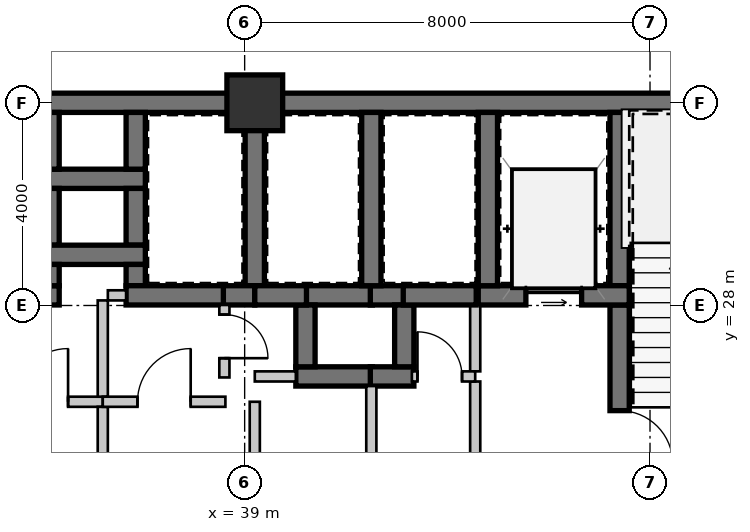
"""IFC4 building model, lengths in metres.
Left out: names, types, materials, properties, quantities, classifications, styles, units other than length and angle.
Written with IfcOpenShell. Run it as: python <this file> out.ifc"""

import sys

from ifc_helpers import new_model, si_unit, direction, frame, frame_2d, origin, origin_2d, place, context, subcontext, project, spatial, rectangle, extrude, source, transform, mapped, element, fill, save


model = new_model("IFC4")
c1 = context("Model", 3, precision=1e-05, world=origin(), true_north=direction((0.0, 1.0)))
c2 = subcontext(c1, "Body", "Model", "MODEL_VIEW")
j1 = project(units=[si_unit("LENGTHUNIT", "METRE"), si_unit("PLANEANGLEUNIT", "RADIAN")], contexts=[c1])
p1 = place(None, origin())
s1 = spatial("IfcSite", under=j1, at=p1, CompositionType="ELEMENT")
p2 = place(p1, origin())
s2 = spatial("IfcBuilding", under=s1, at=p2, CompositionType="ELEMENT")
p3 = place(p2, frame((0.0, 0.0, 12.95)))
s3 = spatial("IfcBuildingStorey", under=s2, at=p3, CompositionType="ELEMENT", Elevation=12.95)
m1 = source(origin(), c2, "Body", "SweptSolid", [
    extrude(rectangle(XDim=1.1, YDim=1.1, at=origin_2d()), origin(), (0.0, 0.0, 1.0), 3.85),
])
p4 = place(p3, frame((39.2, 32.0, 0.0), z_axis=(0.0, 0.0, 1.0), x_axis=(1.0, 0.0, 0.0)))
e1 = element("IfcColumn", 1, at=p4, inside=s3, PredefinedType="COLUMN", context=c2, shape_type="MappedRepresentation", body=[
    mapped(m1, transform((0.0, 0.0, 0.0), scale=1.0)),
])
m2 = source(origin(), c2, "Body", "SweptSolid", [
    extrude(rectangle(XDim=11.2, YDim=0.38, at=frame_2d((5.6, 0.0))), origin(), (0.0, 0.0, 1.0), 3.43),
])
p5 = place(p3, frame((28.0, 32.0, 0.0), z_axis=(0.0, 0.0, 1.0), x_axis=(1.0, 0.0, 0.0)))
e2 = element("IfcWall", 2, at=p5, inside=s3, PredefinedType="SHEAR", context=c2, shape_type="MappedRepresentation", body=[
    mapped(m2, transform((0.0, 0.0, 0.0), scale=1.0)),
])
m3 = source(origin(), c2, "Body", "SweptSolid", [
    extrude(rectangle(XDim=11.99, YDim=0.38, at=frame_2d((5.995, 0.0))), origin(), (0.0, 0.0, 1.0), 3.43),
])
p6 = place(p3, frame((39.2, 32.0, 0.0), z_axis=(0.0, 0.0, 1.0), x_axis=(1.0, 0.0, 0.0)))
e3 = element("IfcWall", 3, at=p6, inside=s3, PredefinedType="SHEAR", context=c2, shape_type="MappedRepresentation", body=[
    mapped(m3, transform((0.0, 0.0, 0.0), scale=1.0)),
])
m4 = source(origin(), c2, "Body", "SweptSolid", [
    extrude(rectangle(XDim=3.42, YDim=0.38, at=frame_2d((1.71, 0.0))), origin(), (0.0, 0.0, 1.0), 3.43),
])
p7 = place(p3, frame((46.4, 31.81, 0.0), z_axis=(0.0, 0.0, 1.0), x_axis=(0.0, -1.0, 0.0)))
e4 = element("IfcWall", 4, at=p7, inside=s3, PredefinedType="SHEAR", context=c2, shape_type="MappedRepresentation", body=[
    mapped(m4, transform((0.0, 0.0, 0.0), scale=1.0)),
])
m5 = source(origin(), c2, "Body", "SweptSolid", [
    extrude(rectangle(XDim=3.82, YDim=0.38, at=frame_2d((1.91, 0.0))), origin(), (0.0, 0.0, 1.0), 3.43),
])
p8 = place(p3, frame((46.4, 28.01, 0.0), z_axis=(0.0, 0.0, 1.0), x_axis=(0.0, -1.0, 0.0)))
e5 = element("IfcWall", 5, at=p8, inside=s3, PredefinedType="SHEAR", context=c2, shape_type="MappedRepresentation", body=[
    mapped(m5, transform((0.0, 0.0, 0.0), scale=1.0)),
])
m6 = source(origin(), c2, "Body", "SweptSolid", [
    extrude(rectangle(XDim=1.05, YDim=2.1, at=frame_2d((0.525, 1.05))), frame((0.0, 0.2, 0.0), z_axis=(0.0, -1.0, 0.0), x_axis=(1.0, 0.0, 0.0)), (0.0, 0.0, 1.0), 0.4),
])
p9 = place(p8, frame((2.085, 0.0, 0.0)))
e6 = element("IfcOpeningElement", 6, at=p9, cuts=e5, PredefinedType="OPENING", context=c2, shape_type="MappedRepresentation", body=[
    mapped(m6, transform((0.0, 0.0, 0.0), scale=1.0)),
])
m7 = source(origin(), c2, "Body", "SweptSolid", [
    extrude(rectangle(XDim=2.98, YDim=0.38, at=frame_2d((1.49, 0.0))), origin(), (0.0, 0.0, 1.0), 3.43),
])
p10 = place(p3, frame((43.61, 28.2, 0.0), z_axis=(0.0, 0.0, 1.0), x_axis=(1.0, 0.0, 0.0)))
e7 = element("IfcWall", 7, at=p10, inside=s3, PredefinedType="SHEAR", context=c2, shape_type="MappedRepresentation", body=[
    mapped(m7, transform((0.0, 0.0, 0.0), scale=1.0)),
])
m8 = source(origin(), c2, "Body", "SweptSolid", [
    extrude(rectangle(XDim=1.1, YDim=2.15, at=frame_2d((0.55, 1.075))), frame((0.0, 0.2, 0.0), z_axis=(0.0, -1.0, 0.0), x_axis=(1.0, 0.0, 0.0)), (0.0, 0.0, 1.0), 0.4),
])
p11 = place(p10, frame((0.94, 0.0, 0.0)))
e8 = element("IfcOpeningElement", 8, at=p11, cuts=e7, PredefinedType="OPENING", context=c2, shape_type="MappedRepresentation", body=[
    mapped(m8, transform((0.0, 0.0, 0.0), scale=1.0)),
])
p12 = place(p3, frame((43.8, 31.81, 0.0), z_axis=(0.0, 0.0, 1.0), x_axis=(0.0, -1.0, 0.0)))
e9 = element("IfcWall", 9, at=p12, inside=s3, PredefinedType="SHEAR", context=c2, shape_type="MappedRepresentation", body=[
    mapped(m4, transform((0.0, 0.0, 0.0), scale=1.0)),
])
m9 = source(origin(), c2, "Body", "SweptSolid", [
    extrude(rectangle(XDim=2.4, YDim=0.2, at=frame_2d((1.2, 0.0))), origin(), (0.0, 0.0, 1.0), 3.43),
])
p13 = place(p3, frame((43.55, 26.5, 0.0), z_axis=(0.0, 0.0, 1.0), x_axis=(0.0, -1.0, 0.0)))
e10 = element("IfcWall", 10, at=p13, inside=s3, PredefinedType="SOLIDWALL", context=c2, shape_type="MappedRepresentation", body=[
    mapped(m9, transform((0.0, 0.0, 0.0), scale=1.0)),
])
m10 = source(origin(), c2, "Body", "SweptSolid", [
    extrude(rectangle(XDim=1.31, YDim=0.2, at=frame_2d((0.655, 0.0))), origin(), (0.0, 0.0, 1.0), 3.43),
])
p14 = place(p3, frame((43.55, 28.01, 0.0), z_axis=(0.0, 0.0, 1.0), x_axis=(0.0, -1.0, 0.0)))
e11 = element("IfcWall", 11, at=p14, inside=s3, PredefinedType="SOLIDWALL", context=c2, shape_type="MappedRepresentation", body=[
    mapped(m10, transform((0.0, 0.0, 0.0), scale=1.0)),
])
m11 = source(origin(), c2, "Body", "SweptSolid", [
    extrude(rectangle(XDim=2.08, YDim=0.38, at=frame_2d((1.04, 0.0))), origin(), (0.0, 0.0, 1.0), 3.43),
])
p15 = place(p3, frame((34.96, 30.5, 0.0), z_axis=(0.0, 0.0, 1.0), x_axis=(1.0, 0.0, 0.0)))
e12 = element("IfcWall", 12, at=p15, inside=s3, PredefinedType="SHEAR", context=c2, shape_type="MappedRepresentation", body=[
    mapped(m11, transform((0.0, 0.0, 0.0), scale=1.0)),
])
m12 = source(origin(), c2, "Body", "SweptSolid", [
    extrude(rectangle(XDim=1.12, YDim=0.38, at=frame_2d((0.56, 0.0))), origin(), (0.0, 0.0, 1.0), 3.43),
])
for number, where, z_axis, x_axis in (
    (13, (35.15, 31.81, 0.0), (0.0, 0.0, 1.0), (0.0, -1.0, 0.0)),
    (14, (36.85, 30.69, 0.0), (0.0, 0.0, 1.0), (0.0, 1.0, 0.0)),
    (15, (35.15, 30.31, 0.0), (0.0, 0.0, 1.0), (0.0, -1.0, 0.0)),
    (16, (36.85, 29.19, 0.0), (0.0, 0.0, 1.0), (0.0, 1.0, 0.0)),
):
    element("IfcWall", number, at=place(p3, frame(where, z_axis=z_axis, x_axis=x_axis)), inside=s3, PredefinedType="SHEAR", context=c2, shape_type="MappedRepresentation", body=[
        mapped(m12, transform((0.0, 0.0, 0.0), scale=1.0)),
    ])
p16 = place(p3, frame((34.96, 29.0, 0.0), z_axis=(0.0, 0.0, 1.0), x_axis=(1.0, 0.0, 0.0)))
e17 = element("IfcWall", 17, at=p16, inside=s3, PredefinedType="SHEAR", context=c2, shape_type="MappedRepresentation", body=[
    mapped(m11, transform((0.0, 0.0, 0.0), scale=1.0)),
])
m13 = source(origin(), c2, "Body", "SweptSolid", [
    extrude(rectangle(XDim=1.32, YDim=0.38, at=frame_2d((0.66, 0.0))), origin(), (0.0, 0.0, 1.0), 3.43),
])
p17 = place(p3, frame((41.52, 28.2, 0.0), z_axis=(0.0, 0.0, 1.0), x_axis=(-1.0, 0.0, 0.0)))
e18 = element("IfcWall", 18, at=p17, inside=s3, PredefinedType="SHEAR", context=c2, shape_type="MappedRepresentation", body=[
    mapped(m13, transform((0.0, 0.0, 0.0), scale=1.0)),
])
m14 = source(origin(), c2, "Body", "SweptSolid", [
    extrude(rectangle(XDim=0.67, YDim=0.38, at=frame_2d((0.335, 0.0))), origin(), (0.0, 0.0, 1.0), 3.43),
])
p18 = place(p3, frame((42.15, 28.2, 0.0), z_axis=(0.0, 0.0, 1.0), x_axis=(-1.0, 0.0, 0.0)))
e19 = element("IfcWall", 19, at=p18, inside=s3, PredefinedType="SHEAR", context=c2, shape_type="MappedRepresentation", body=[
    mapped(m14, transform((0.0, 0.0, 0.0), scale=1.0)),
])
m15 = source(origin(), c2, "Body", "SweptSolid", [
    extrude(rectangle(XDim=1.51, YDim=0.38, at=frame_2d((0.755, 0.0))), origin(), (0.0, 0.0, 1.0), 3.43),
])
p19 = place(p3, frame((40.01, 26.6, 0.0), z_axis=(0.0, 0.0, 1.0), x_axis=(1.0, 0.0, 0.0)))
e20 = element("IfcWall", 20, at=p19, inside=s3, PredefinedType="SHEAR", context=c2, shape_type="MappedRepresentation", body=[
    mapped(m15, transform((0.0, 0.0, 0.0), scale=1.0)),
])
m16 = source(origin(), c2, "Body", "SweptSolid", [
    extrude(rectangle(XDim=1.22, YDim=0.38, at=frame_2d((0.61, 0.0))), origin(), (0.0, 0.0, 1.0), 3.43),
])
p20 = place(p3, frame((40.2, 28.01, 0.0), z_axis=(0.0, 0.0, 1.0), x_axis=(0.0, -1.0, 0.0)))
e21 = element("IfcWall", 21, at=p20, inside=s3, PredefinedType="SHEAR", context=c2, shape_type="MappedRepresentation", body=[
    mapped(m16, transform((0.0, 0.0, 0.0), scale=1.0)),
])
m17 = source(origin(), c2, "Body", "SweptSolid", [
    extrude(rectangle(XDim=0.86, YDim=0.38, at=frame_2d((0.43, 0.0))), origin(), (0.0, 0.0, 1.0), 3.43),
])
p21 = place(p3, frame((41.48, 26.6, 0.0), z_axis=(0.0, 0.0, 1.0), x_axis=(1.0, 0.0, 0.0)))
e22 = element("IfcWall", 22, at=p21, inside=s3, PredefinedType="SHEAR", context=c2, shape_type="MappedRepresentation", body=[
    mapped(m17, transform((0.0, 0.0, 0.0), scale=1.0)),
])
p22 = place(p3, frame((42.15, 26.79, 0.0), z_axis=(0.0, 0.0, 1.0), x_axis=(0.0, 1.0, 0.0)))
e23 = element("IfcWall", 23, at=p22, inside=s3, PredefinedType="SHEAR", context=c2, shape_type="MappedRepresentation", body=[
    mapped(m16, transform((0.0, 0.0, 0.0), scale=1.0)),
])
m18 = source(origin(), c2, "Body", "SweptSolid", [
    extrude(rectangle(XDim=1.56, YDim=0.38, at=frame_2d((0.78, 0.0))), origin(), (0.0, 0.0, 1.0), 3.43),
])
p23 = place(p3, frame((33.78, 28.2, 0.0), z_axis=(0.0, 0.0, 1.0), x_axis=(1.0, 0.0, 0.0)))
e24 = element("IfcWall", 24, at=p23, inside=s3, PredefinedType="SHEAR", context=c2, shape_type="MappedRepresentation", body=[
    mapped(m18, transform((0.0, 0.0, 0.0), scale=1.0)),
])
m19 = source(origin(), c2, "Body", "SweptSolid", [
    extrude(rectangle(XDim=0.42, YDim=0.38, at=frame_2d((0.21, 0.0))), origin(), (0.0, 0.0, 1.0), 3.43),
])
p24 = place(p3, frame((35.15, 28.39, 0.0), z_axis=(0.0, 0.0, 1.0), x_axis=(0.0, 1.0, 0.0)))
e25 = element("IfcWall", 25, at=p24, inside=s3, PredefinedType="SHEAR", context=c2, shape_type="MappedRepresentation", body=[
    mapped(m19, transform((0.0, 0.0, 0.0), scale=1.0)),
])
p25 = place(p3, frame((39.2, 28.39, 0.0), z_axis=(0.0, 0.0, 1.0), x_axis=(0.0, 1.0, 0.0)))
e26 = element("IfcWall", 26, at=p25, inside=s3, PredefinedType="SHEAR", context=c2, shape_type="MappedRepresentation", body=[
    mapped(m4, transform((0.0, 0.0, 0.0), scale=1.0)),
])
p26 = place(p3, frame((36.85, 28.81, 0.0), z_axis=(0.0, 0.0, 1.0), x_axis=(0.0, -1.0, 0.0)))
e27 = element("IfcWall", 27, at=p26, inside=s3, PredefinedType="SHEAR", context=c2, shape_type="MappedRepresentation", body=[
    mapped(m19, transform((0.0, 0.0, 0.0), scale=1.0)),
])
m20 = source(origin(), c2, "Body", "SweptSolid", [
    extrude(rectangle(XDim=1.96, YDim=0.38, at=frame_2d((0.98, 0.0))), origin(), (0.0, 0.0, 1.0), 3.43),
])
p27 = place(p3, frame((36.66, 28.2, 0.0), z_axis=(0.0, 0.0, 1.0), x_axis=(1.0, 0.0, 0.0)))
e28 = element("IfcWall", 28, at=p27, inside=s3, PredefinedType="SHEAR", context=c2, shape_type="MappedRepresentation", body=[
    mapped(m20, transform((0.0, 0.0, 0.0), scale=1.0)),
])
m21 = source(origin(), c2, "Body", "SweptSolid", [
    extrude(rectangle(XDim=0.62, YDim=0.38, at=frame_2d((0.31, 0.0))), origin(), (0.0, 0.0, 1.0), 3.43),
])
p28 = place(p3, frame((38.58, 28.2, 0.0), z_axis=(0.0, 0.0, 1.0), x_axis=(1.0, 0.0, 0.0)))
e29 = element("IfcWall", 29, at=p28, inside=s3, PredefinedType="SHEAR", context=c2, shape_type="MappedRepresentation", body=[
    mapped(m21, transform((0.0, 0.0, 0.0), scale=1.0)),
])
p29 = place(p3, frame((41.5, 28.39, 0.0), z_axis=(0.0, 0.0, 1.0), x_axis=(0.0, 1.0, 0.0)))
e30 = element("IfcWall", 30, at=p29, inside=s3, PredefinedType="SHEAR", context=c2, shape_type="MappedRepresentation", body=[
    mapped(m4, transform((0.0, 0.0, 0.0), scale=1.0)),
])
m22 = source(origin(), c2, "Body", "SweptSolid", [
    extrude(rectangle(XDim=1.02, YDim=0.38, at=frame_2d((0.51, 0.0))), origin(), (0.0, 0.0, 1.0), 3.43),
])
p30 = place(p3, frame((39.2, 28.2, 0.0), z_axis=(0.0, 0.0, 1.0), x_axis=(1.0, 0.0, 0.0)))
e31 = element("IfcWall", 31, at=p30, inside=s3, PredefinedType="SHEAR", context=c2, shape_type="MappedRepresentation", body=[
    mapped(m22, transform((0.0, 0.0, 0.0), scale=1.0)),
])
m23 = source(origin(), c2, "Body", "SweptSolid", [
    extrude(rectangle(XDim=1.44, YDim=0.38, at=frame_2d((0.72, 0.0))), origin(), (0.0, 0.0, 1.0), 3.43),
])
p31 = place(p3, frame((42.13, 28.2, 0.0), z_axis=(0.0, 0.0, 1.0), x_axis=(1.0, 0.0, 0.0)))
e32 = element("IfcWall", 32, at=p31, inside=s3, PredefinedType="SHEAR", context=c2, shape_type="MappedRepresentation", body=[
    mapped(m23, transform((0.0, 0.0, 0.0), scale=1.0)),
])
m24 = source(origin(), c2, "Body", "SweptSolid", [
    extrude(rectangle(XDim=2.42, YDim=0.2, at=frame_2d((1.21, 0.0))), origin(), (0.0, 0.0, 1.0), 3.43),
])
p32 = place(p3, frame((33.78, 26.1, 0.0), z_axis=(0.0, 0.0, 1.0), x_axis=(1.0, 0.0, 0.0)))
e33 = element("IfcWall", 33, at=p32, inside=s3, PredefinedType="SOLIDWALL", context=c2, shape_type="MappedRepresentation", body=[
    mapped(m24, transform((0.0, 0.0, 0.0), scale=1.0)),
])
m25 = source(origin(), c2, "Body", "SweptSolid", [
    extrude(rectangle(XDim=1.05, YDim=2.1, at=frame_2d((0.525, 1.05))), frame((0.0, 0.11, 0.0), z_axis=(0.0, -1.0, 0.0), x_axis=(1.0, 0.0, 0.0)), (0.0, 0.0, 1.0), 0.22),
])
p33 = place(p32, frame((0.685, 0.0, 0.0)))
e34 = element("IfcOpeningElement", 34, at=p33, cuts=e33, PredefinedType="OPENING", context=c2, shape_type="MappedRepresentation", body=[
    mapped(m25, transform((0.0, 0.0, 0.0), scale=1.0)),
])
m26 = source(origin(), c2, "Body", "SweptSolid", [
    extrude(rectangle(XDim=1.9, YDim=0.2, at=frame_2d((0.95, 0.0))), origin(), (0.0, 0.0, 1.0), 3.43),
])
p34 = place(p3, frame((36.2, 26.0, 0.0), z_axis=(0.0, 0.0, 1.0), x_axis=(0.0, -1.0, 0.0)))
e35 = element("IfcWall", 35, at=p34, inside=s3, PredefinedType="SOLIDWALL", context=c2, shape_type="MappedRepresentation", body=[
    mapped(m26, transform((0.0, 0.0, 0.0), scale=1.0)),
])
m27 = source(origin(), c2, "Body", "SweptSolid", [
    extrude(rectangle(XDim=1.9, YDim=0.2, at=frame_2d((0.95, 0.0))), origin(), (0.0, 0.0, 1.0), 3.43),
])
p35 = place(p3, frame((36.2, 28.1, 0.0), z_axis=(0.0, 0.0, 1.0), x_axis=(0.0, -1.0, 0.0)))
e36 = element("IfcWall", 36, at=p35, inside=s3, PredefinedType="SOLIDWALL", context=c2, shape_type="MappedRepresentation", body=[
    mapped(m27, transform((0.0, 0.0, 0.0), scale=1.0)),
])
m28 = source(origin(), c2, "Body", "SweptSolid", [
    extrude(rectangle(XDim=0.36, YDim=0.2, at=frame_2d((0.18, 0.0))), origin(), (0.0, 0.0, 1.0), 3.43),
])
p36 = place(p3, frame((36.66, 28.2, 0.0), z_axis=(0.0, 0.0, 1.0), x_axis=(-1.0, 0.0, 0.0)))
e37 = element("IfcWall", 37, at=p36, inside=s3, PredefinedType="SOLIDWALL", context=c2, shape_type="MappedRepresentation", body=[
    mapped(m28, transform((0.0, 0.0, 0.0), scale=1.0)),
])
m29 = source(origin(), c2, "Body", "SweptSolid", [
    extrude(rectangle(XDim=2.42, YDim=0.2, at=frame_2d((1.21, 0.0))), origin(), (0.0, 0.0, 1.0), 3.43),
])
p37 = place(p3, frame((36.2, 26.1, 0.0), z_axis=(0.0, 0.0, 1.0), x_axis=(1.0, 0.0, 0.0)))
e38 = element("IfcWall", 38, at=p37, inside=s3, PredefinedType="SOLIDWALL", context=c2, shape_type="MappedRepresentation", body=[
    mapped(m29, transform((0.0, 0.0, 0.0), scale=1.0)),
])
p38 = place(p37, frame((0.685, 0.0, 0.0)))
e39 = element("IfcOpeningElement", 39, at=p38, cuts=e38, PredefinedType="OPENING", context=c2, shape_type="MappedRepresentation", body=[
    mapped(m25, transform((0.0, 0.0, 0.0), scale=1.0)),
])
m30 = source(origin(), c2, "Body", "SweptSolid", [
    extrude(rectangle(XDim=2.0, YDim=0.2, at=frame_2d((1.0, 0.0))), origin(), (0.0, 0.0, 1.0), 2.97),
])
p39 = place(p3, frame((39.2, 26.1, 0.0), z_axis=(0.0, 0.0, 1.0), x_axis=(0.0, -1.0, 0.0)))
e40 = element("IfcWall", 40, at=p39, inside=s3, PredefinedType="SOLIDWALL", context=c2, shape_type="MappedRepresentation", body=[
    mapped(m30, transform((0.0, 0.0, 0.0), scale=1.0)),
])
m31 = source(origin(), c2, "Body", "SweptSolid", [
    extrude(rectangle(XDim=1.43, YDim=0.2, at=frame_2d((0.715, 0.0))), origin(), (0.0, 0.0, 1.0), 3.43),
])
p40 = place(p3, frame((38.6, 28.01, 0.0), z_axis=(0.0, 0.0, 1.0), x_axis=(0.0, -1.0, 0.0)))
e41 = element("IfcWall", 41, at=p40, inside=s3, PredefinedType="SOLIDWALL", context=c2, shape_type="MappedRepresentation", body=[
    mapped(m31, transform((0.0, 0.0, 0.0), scale=1.0)),
])
m32 = source(origin(), c2, "Body", "SweptSolid", [
    extrude(rectangle(XDim=0.86, YDim=2.1, at=frame_2d((0.43, 1.05))), frame((0.0, 0.11, 0.0), z_axis=(0.0, -1.0, 0.0), x_axis=(1.0, 0.0, 0.0)), (0.0, 0.0, 1.0), 0.22),
])
p41 = place(p40, frame((0.19, 0.0, 0.0)))
e42 = element("IfcOpeningElement", 42, at=p41, cuts=e41, PredefinedType="OPENING", context=c2, shape_type="MappedRepresentation", body=[
    mapped(m32, transform((0.0, 0.0, 0.0), scale=1.0)),
])
m33 = source(origin(), c2, "Body", "SweptSolid", [
    extrude(rectangle(XDim=0.81, YDim=0.2, at=frame_2d((0.405, 0.0))), origin(), (0.0, 0.0, 1.0), 3.43),
])
p42 = place(p3, frame((39.2, 26.6, 0.0), z_axis=(0.0, 0.0, 1.0), x_axis=(1.0, 0.0, 0.0)))
e43 = element("IfcWall", 43, at=p42, inside=s3, PredefinedType="SOLIDWALL", context=c2, shape_type="MappedRepresentation", body=[
    mapped(m33, transform((0.0, 0.0, 0.0), scale=1.0)),
])
m34 = source(origin(), c2, "Body", "SweptSolid", [
    extrude(rectangle(XDim=2.31, YDim=0.2, at=frame_2d((1.155, 0.0))), origin(), (0.0, 0.0, 1.0), 3.43),
])
p43 = place(p3, frame((41.5, 26.41, 0.0), z_axis=(0.0, 0.0, 1.0), x_axis=(0.0, -1.0, 0.0)))
e44 = element("IfcWall", 44, at=p43, inside=s3, PredefinedType="SOLIDWALL", context=c2, shape_type="MappedRepresentation", body=[
    mapped(m34, transform((0.0, 0.0, 0.0), scale=1.0)),
])
m35 = source(origin(), c2, "Body", "SweptSolid", [
    extrude(rectangle(XDim=1.25, YDim=0.2, at=frame_2d((0.625, 0.0))), origin(), (0.0, 0.0, 1.0), 3.43),
])
p44 = place(p3, frame((42.3, 26.6, 0.0), z_axis=(0.0, 0.0, 1.0), x_axis=(1.0, 0.0, 0.0)))
e45 = element("IfcWall", 45, at=p44, inside=s3, PredefinedType="SOLIDWALL", context=c2, shape_type="MappedRepresentation", body=[
    mapped(m35, transform((0.0, 0.0, 0.0), scale=1.0)),
])
m36 = source(origin(), c2, "Body", "SweptSolid", [
    extrude(rectangle(XDim=0.88, YDim=2.1, at=frame_2d((0.44, 1.05))), frame((0.0, 0.11, 0.0), z_axis=(0.0, -1.0, 0.0), x_axis=(1.0, 0.0, 0.0)), (0.0, 0.0, 1.0), 0.22),
])
p45 = place(p44, frame((0.11, 0.0, 0.0)))
e46 = element("IfcOpeningElement", 46, at=p45, cuts=e45, PredefinedType="OPENING", context=c2, shape_type="MappedRepresentation", body=[
    mapped(m36, transform((0.0, 0.0, 0.0), scale=1.0)),
])
m37 = source(origin(), c2, "Body", "SweptSolid", [
    extrude(rectangle(XDim=1.05, YDim=2.1, at=frame_2d((0.525, 1.05))), frame((0.0, 0.025, 0.0), z_axis=(0.0, -1.0, 0.0), x_axis=(1.0, 0.0, 0.0)), (0.0, 0.0, 1.0), 0.05),
])
p46 = place(p9, origin())
e47 = element("IfcDoor", 47, at=p46, inside=s3, OperationType="SINGLE_SWING_RIGHT", PredefinedType="DOOR", context=c2, shape_type="MappedRepresentation", body=[
    mapped(m37, transform((0.0, 0.0, 0.0), scale=1.0)),
])
fill(e6, e47)
m38 = source(origin(), c2, "Body", "SweptSolid", [
    extrude(rectangle(XDim=1.1, YDim=2.15, at=frame_2d((0.55, 1.075))), frame((0.0, 0.025, 0.0), z_axis=(0.0, -1.0, 0.0), x_axis=(1.0, 0.0, 0.0)), (0.0, 0.0, 1.0), 0.05),
])
p47 = place(p11, origin())
e48 = element("IfcDoor", 48, at=p47, inside=s3, OperationType="SLIDING_TO_LEFT", PredefinedType="DOOR", context=c2, shape_type="MappedRepresentation", body=[
    mapped(m38, transform((0.0, 0.0, 0.0), scale=1.0)),
])
fill(e8, e48)
p48 = place(p33, origin())
e49 = element("IfcDoor", 49, at=p48, inside=s3, OperationType="SINGLE_SWING_RIGHT", PredefinedType="DOOR", context=c2, shape_type="MappedRepresentation", body=[
    mapped(m37, transform((0.0, 0.0, 0.0), scale=1.0)),
])
fill(e34, e49)
p49 = place(p38, origin())
e50 = element("IfcDoor", 50, at=p49, inside=s3, OperationType="SINGLE_SWING_RIGHT", PredefinedType="DOOR", context=c2, shape_type="MappedRepresentation", body=[
    mapped(m37, transform((0.0, 0.0, 0.0), scale=1.0)),
])
fill(e39, e50)
m39 = source(origin(), c2, "Body", "SweptSolid", [
    extrude(rectangle(XDim=0.88, YDim=2.1, at=frame_2d((0.44, 1.05))), frame((0.0, 0.025, 0.0), z_axis=(0.0, -1.0, 0.0), x_axis=(1.0, 0.0, 0.0)), (0.0, 0.0, 1.0), 0.05),
])
p50 = place(p45, origin())
e51 = element("IfcDoor", 51, at=p50, inside=s3, OperationType="SINGLE_SWING_LEFT", PredefinedType="DOOR", context=c2, shape_type="MappedRepresentation", body=[
    mapped(m39, transform((0.0, 0.0, 0.0), scale=1.0)),
])
fill(e46, e51)
m40 = source(origin(), c2, "Body", "SweptSolid", [
    extrude(rectangle(XDim=0.86, YDim=2.1, at=frame_2d((0.43, 1.05))), frame((0.0, 0.025, 0.0), z_axis=(0.0, -1.0, 0.0), x_axis=(1.0, 0.0, 0.0)), (0.0, 0.0, 1.0), 0.05),
])
p51 = place(p41, origin())
e52 = element("IfcDoor", 52, at=p51, inside=s3, OperationType="SINGLE_SWING_RIGHT", PredefinedType="DOOR", context=c2, shape_type="MappedRepresentation", body=[
    mapped(m40, transform((0.0, 0.0, 0.0), scale=1.0)),
])
fill(e42, e52)
save(model, sys.argv[1])
